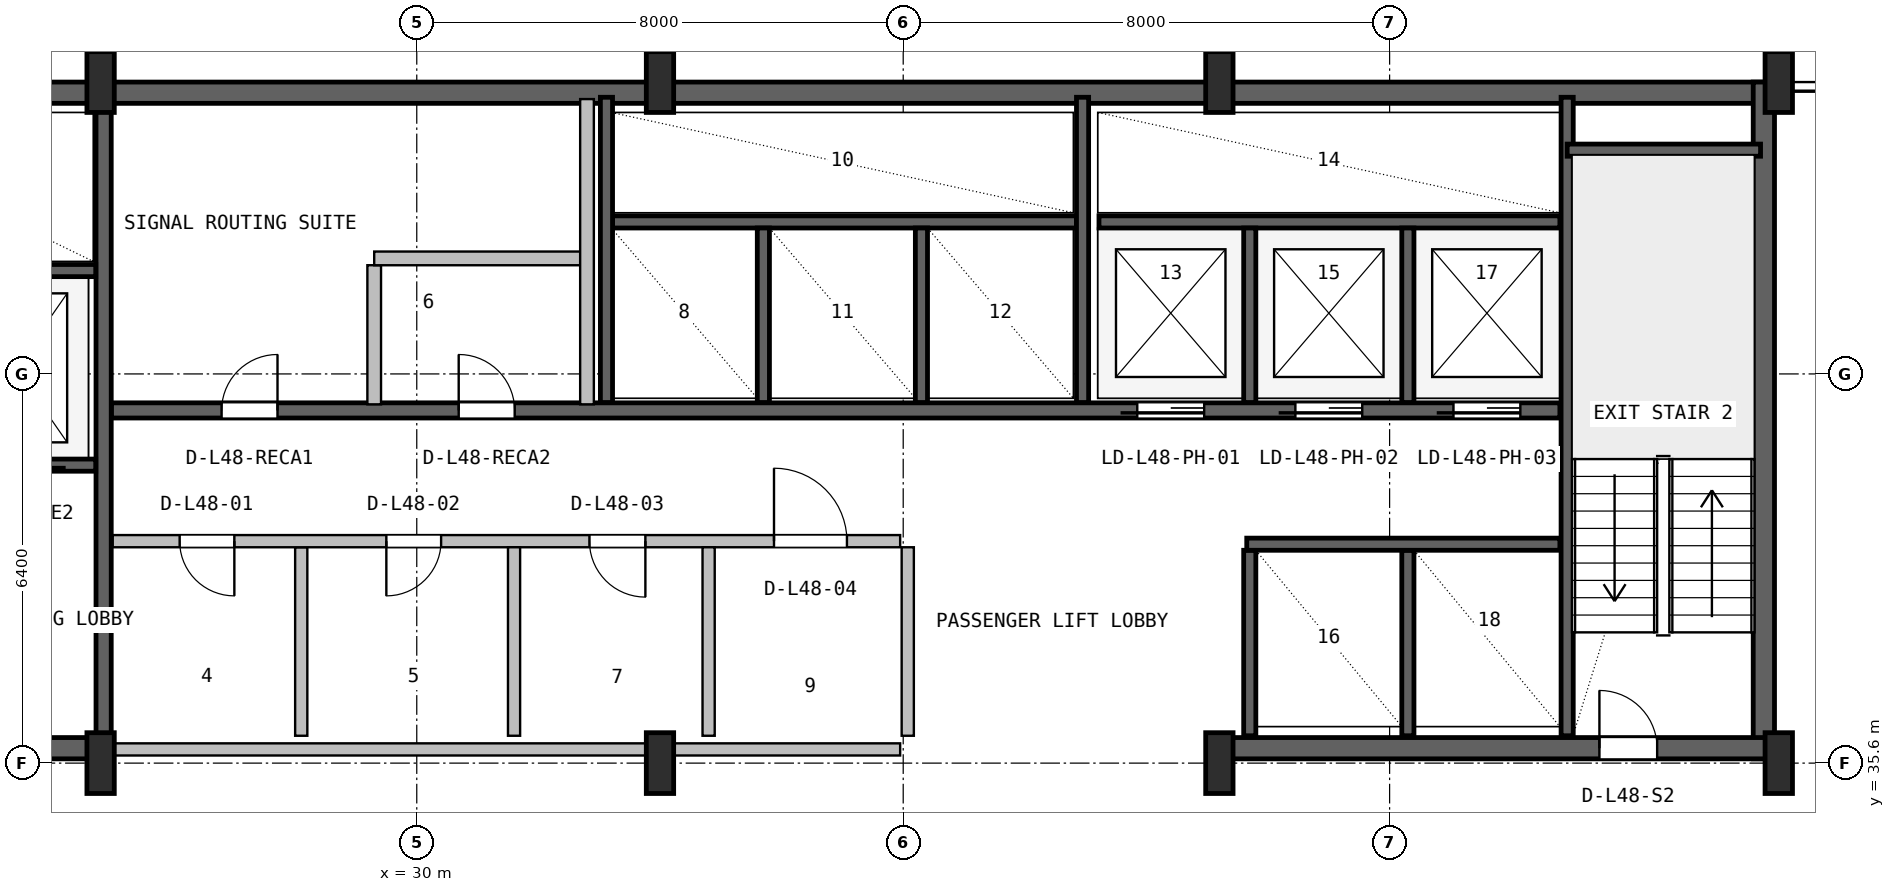
"""IFC4 building model, lengths in metres.
Left out: names, types, materials, properties, quantities, classifications, styles, units other than length and angle.
Written with IfcOpenShell. Run it as: python <this file> out.ifc"""

import sys

from ifc_helpers import new_model, si_unit, direction, frame, frame_2d, origin, origin_2d, place, context, subcontext, project, spatial, rectangle, i_section, extrude, source, transform, mapped, element, fill, save


model = new_model("IFC4")
c1 = context("Model", 3, precision=1e-05, world=origin(), true_north=direction((0.0, 1.0)))
c2 = subcontext(c1, "Body", "Model", "MODEL_VIEW")
j1 = project(units=[si_unit("LENGTHUNIT", "METRE"), si_unit("PLANEANGLEUNIT", "RADIAN")], contexts=[c1])
p1 = place(None, origin())
s1 = spatial("IfcSite", under=j1, at=p1, CompositionType="ELEMENT")
p2 = place(p1, origin())
s2 = spatial("IfcBuilding", under=s1, at=p2, CompositionType="ELEMENT")
p3 = place(p2, frame((0.0, 0.0, 196.0)))
s3 = spatial("IfcBuildingStorey", under=s2, at=p3, CompositionType="ELEMENT", Elevation=196.0)
p4 = place(p3, frame((15.6, 46.625, 0.0), z_axis=(0.0, 0.0, 1.0), x_axis=(1.0, 0.0, 0.0)))
e1 = element("IfcWall", 1, at=p4, inside=s3, PredefinedType="SHEAR", context=c2, shape_type="SweptSolid", body=[
    extrude(rectangle(XDim=36.8, YDim=0.35, at=frame_2d((18.4, 0.0))), origin(), (0.0, 0.0, 1.0), 3.55),
])
p5 = place(p3, frame((52.155, 35.67, 0.0), z_axis=(0.0, 0.0, 1.0), x_axis=(0.0, 1.0, 0.0)))
e2 = element("IfcWall", 2, at=p5, inside=s3, PredefinedType="SHEAR", context=c2, shape_type="SweptSolid", body=[
    extrude(rectangle(XDim=11.13, YDim=0.35, at=frame_2d((5.565, 0.0))), origin(), (0.0, 0.0, 1.0), 3.55),
])
p6 = place(p3, frame((15.67, 35.845, 0.0), z_axis=(0.0, 0.0, 1.0), x_axis=(1.0, 0.0, 0.0)))
e3 = element("IfcWall", 3, at=p6, inside=s3, PredefinedType="SHEAR", context=c2, shape_type="SweptSolid", body=[
    extrude(rectangle(XDim=9.13, YDim=0.35, at=frame_2d((4.565, 0.0))), origin(), (0.0, 0.0, 1.0), 3.55),
])
p7 = place(p6, frame((5.4, 0.0, 0.0)))
e4 = element("IfcOpeningElement", 4, at=p7, cuts=e3, PredefinedType="OPENING", context=c2, shape_type="SweptSolid", body=[
    extrude(rectangle(XDim=1.0, YDim=2.1, at=frame_2d((0.5, 1.05))), frame((0.0, 0.185, 0.0), z_axis=(0.0, -1.0, 0.0), x_axis=(1.0, 0.0, 0.0)), (0.0, 0.0, 1.0), 0.37),
])
p8 = place(p3, frame((43.2, 35.845, 0.0), z_axis=(0.0, 0.0, 1.0), x_axis=(1.0, 0.0, 0.0)))
e5 = element("IfcWall", 5, at=p8, inside=s3, PredefinedType="SHEAR", context=c2, shape_type="SweptSolid", body=[
    extrude(rectangle(XDim=9.13, YDim=0.35, at=frame_2d((4.565, 0.0))), origin(), (0.0, 0.0, 1.0), 3.55),
])
p9 = place(p8, frame((6.25, 0.0, 0.0)))
e6 = element("IfcOpeningElement", 6, at=p9, cuts=e5, PredefinedType="OPENING", context=c2, shape_type="SweptSolid", body=[
    extrude(rectangle(XDim=0.95, YDim=2.1, at=frame_2d((0.475, 1.05))), frame((0.0, 0.185, 0.0), z_axis=(0.0, -1.0, 0.0), x_axis=(1.0, 0.0, 0.0)), (0.0, 0.0, 1.0), 0.37),
])
m1 = source(origin(), c2, "Body", "SweptSolid", [
    extrude(i_section(OverallWidth=0.45, OverallDepth=1.0, WebThickness=0.016, FlangeThickness=0.03, FilletRadius=0.016, at=origin_2d()), origin(), (0.0, 0.0, 1.0), 3.8),
])
for number, where, z_axis, x_axis in (
    (7, (24.8, 35.6, 0.0), (0.0, 0.0, 1.0), (1.0, 0.0, 0.0)),
    (8, (24.8, 46.8, 0.0), (0.0, 0.0, 1.0), (1.0, 0.0, 0.0)),
    (9, (34.0, 35.6, 0.0), (0.0, 0.0, 1.0), (1.0, 0.0, 0.0)),
    (10, (34.0, 46.8, 0.0), (0.0, 0.0, 1.0), (1.0, 0.0, 0.0)),
    (11, (43.2, 35.6, 0.0), (0.0, 0.0, 1.0), (1.0, 0.0, 0.0)),
    (12, (43.2, 46.8, 0.0), (0.0, 0.0, 1.0), (1.0, 0.0, 0.0)),
    (13, (52.4, 35.6, 0.0), (0.0, 0.0, 1.0), (1.0, 0.0, 0.0)),
    (14, (52.4, 46.8, 0.0), (0.0, 0.0, 1.0), (1.0, 0.0, 0.0)),
):
    element("IfcColumn", number, at=place(p3, frame(where, z_axis=z_axis, x_axis=x_axis)), inside=s3, PredefinedType="COLUMN", context=c2, shape_type="MappedRepresentation", body=[
        mapped(m1, transform((0.0, 0.0, 0.0), x_axis=(1.0, 0.0, 0.0), y_axis=(0.0, 1.0, 0.0), z_axis=(0.0, 0.0, 1.0), scale=1.0)),
    ])
p10 = place(p3, frame((24.85, 36.05, 0.0), z_axis=(0.0, 0.0, 1.0), x_axis=(0.0, 1.0, 0.0)))
e15 = element("IfcWall", 15, at=p10, inside=s3, PredefinedType="SHEAR", context=c2, shape_type="SweptSolid", body=[
    extrude(rectangle(XDim=10.45, YDim=0.25, at=frame_2d((5.225, 0.0))), origin(), (0.0, 0.0, 1.0), 3.55),
])
p11 = place(p3, frame((19.2, 40.5, 0.0), z_axis=(0.0, 0.0, 1.0), x_axis=(1.0, 0.0, 0.0)))
e16 = element("IfcWall", 16, at=p11, inside=s3, PredefinedType="SHEAR", context=c2, shape_type="SweptSolid", body=[
    extrude(rectangle(XDim=5.52, YDim=0.2, at=frame_2d((2.76, 0.0))), origin(), (0.0, 0.0, 1.0), 3.55),
])
p12 = place(p11, frame((1.05, 0.0, 0.0)))
e17 = element("IfcOpeningElement", 17, at=p12, cuts=e16, PredefinedType="OPENING", context=c2, shape_type="SweptSolid", body=[
    extrude(rectangle(XDim=1.1, YDim=2.18, at=frame_2d((0.55, 1.09))), frame((0.0, 0.11, 0.0), z_axis=(0.0, -1.0, 0.0), x_axis=(1.0, 0.0, 0.0)), (0.0, 0.0, 1.0), 0.22),
])
p13 = place(p11, frame((3.65, 0.0, 0.0)))
e18 = element("IfcOpeningElement", 18, at=p13, cuts=e16, PredefinedType="OPENING", context=c2, shape_type="SweptSolid", body=[
    extrude(rectangle(XDim=1.1, YDim=2.18, at=frame_2d((0.55, 1.09))), frame((0.0, 0.11, 0.0), z_axis=(0.0, -1.0, 0.0), x_axis=(1.0, 0.0, 0.0)), (0.0, 0.0, 1.0), 0.22),
])
p14 = place(p3, frame((19.2, 43.7, 0.0), z_axis=(0.0, 0.0, 1.0), x_axis=(1.0, 0.0, 0.0)))
e19 = element("IfcWall", 19, at=p14, inside=s3, PredefinedType="SHEAR", context=c2, shape_type="SweptSolid", body=[
    extrude(rectangle(XDim=5.52, YDim=0.2, at=frame_2d((2.76, 0.0))), origin(), (0.0, 0.0, 1.0), 3.55),
])
p15 = place(p3, frame((48.92, 36.05, 0.0), z_axis=(0.0, 0.0, 1.0), x_axis=(0.0, 1.0, 0.0)))
e20 = element("IfcWall", 20, at=p15, inside=s3, PredefinedType="SHEAR", context=c2, shape_type="SweptSolid", body=[
    extrude(rectangle(XDim=10.5, YDim=0.2, at=frame_2d((5.25, 0.0))), origin(), (0.0, 0.0, 1.0), 3.55),
])
p16 = place(p3, frame((48.92, 45.68, 0.0), z_axis=(0.0, 0.0, 1.0), x_axis=(1.0, 0.0, 0.0)))
e21 = element("IfcWall", 21, at=p16, inside=s3, PredefinedType="SHEAR", context=c2, shape_type="SweptSolid", body=[
    extrude(rectangle(XDim=3.18, YDim=0.2, at=frame_2d((1.59, 0.0))), origin(), (0.0, 0.0, 1.0), 3.55),
])
p17 = place(p3, frame((24.98, 41.4, 0.0), z_axis=(0.0, 0.0, 1.0), x_axis=(1.0, 0.0, 0.0)))
e22 = element("IfcWall", 22, at=p17, inside=s3, PredefinedType="SHEAR", context=c2, shape_type="SweptSolid", body=[
    extrude(rectangle(XDim=23.82, YDim=0.25, at=frame_2d((11.91, 0.0))), origin(), (0.0, 0.0, 1.0), 3.55),
])
p18 = place(p17, frame((16.87, 0.0, 0.0)))
e23 = element("IfcOpeningElement", 23, at=p18, cuts=e22, PredefinedType="OPENING", context=c2, shape_type="SweptSolid", body=[
    extrude(rectangle(XDim=1.1, YDim=2.18, at=frame_2d((0.55, 1.09))), frame((0.0, 0.135, 0.0), z_axis=(0.0, -1.0, 0.0), x_axis=(1.0, 0.0, 0.0)), (0.0, 0.0, 1.0), 0.27),
])
p19 = place(p17, frame((19.47, 0.0, 0.0)))
e24 = element("IfcOpeningElement", 24, at=p19, cuts=e22, PredefinedType="OPENING", context=c2, shape_type="SweptSolid", body=[
    extrude(rectangle(XDim=1.1, YDim=2.18, at=frame_2d((0.55, 1.09))), frame((0.0, 0.135, 0.0), z_axis=(0.0, -1.0, 0.0), x_axis=(1.0, 0.0, 0.0)), (0.0, 0.0, 1.0), 0.27),
])
p20 = place(p17, frame((22.07, 0.0, 0.0)))
e25 = element("IfcOpeningElement", 25, at=p20, cuts=e22, PredefinedType="OPENING", context=c2, shape_type="SweptSolid", body=[
    extrude(rectangle(XDim=1.1, YDim=2.18, at=frame_2d((0.55, 1.09))), frame((0.0, 0.135, 0.0), z_axis=(0.0, -1.0, 0.0), x_axis=(1.0, 0.0, 0.0)), (0.0, 0.0, 1.0), 0.27),
])
p21 = place(p17, frame((1.81, 0.0, 0.0)))
e26 = element("IfcOpeningElement", 26, at=p21, cuts=e22, PredefinedType="OPENING", context=c2, shape_type="SweptSolid", body=[
    extrude(rectangle(XDim=0.92, YDim=2.08, at=frame_2d((0.46, 1.04))), frame((0.0, 0.135, 0.0), z_axis=(0.0, -1.0, 0.0), x_axis=(1.0, 0.0, 0.0)), (0.0, 0.0, 1.0), 0.27),
])
p22 = place(p17, frame((5.71, 0.0, 0.0)))
e27 = element("IfcOpeningElement", 27, at=p22, cuts=e22, PredefinedType="OPENING", context=c2, shape_type="SweptSolid", body=[
    extrude(rectangle(XDim=0.92, YDim=2.08, at=frame_2d((0.46, 1.04))), frame((0.0, 0.135, 0.0), z_axis=(0.0, -1.0, 0.0), x_axis=(1.0, 0.0, 0.0)), (0.0, 0.0, 1.0), 0.27),
])
p23 = place(p3, frame((33.22, 44.5, 0.0), z_axis=(0.0, 0.0, 1.0), x_axis=(1.0, 0.0, 0.0)))
e28 = element("IfcWall", 28, at=p23, inside=s3, PredefinedType="SHEAR", context=c2, shape_type="SweptSolid", body=[
    extrude(rectangle(XDim=7.63, YDim=0.2, at=frame_2d((3.815, 0.0))), origin(), (0.0, 0.0, 1.0), 3.55),
])
p24 = place(p3, frame((33.12, 41.53, 0.0), z_axis=(0.0, 0.0, 1.0), x_axis=(0.0, 1.0, 0.0)))
e29 = element("IfcWall", 29, at=p24, inside=s3, PredefinedType="SHEAR", context=c2, shape_type="SweptSolid", body=[
    extrude(rectangle(XDim=5.02, YDim=0.2, at=frame_2d((2.51, 0.0))), origin(), (0.0, 0.0, 1.0), 3.55),
])
for number, where, z_axis, x_axis in (
    (30, (35.7, 41.53, 0.0), (0.0, 0.0, 1.0), (0.0, 1.0, 0.0)),
    (31, (38.3, 41.53, 0.0), (0.0, 0.0, 1.0), (0.0, 1.0, 0.0)),
):
    element("IfcWall", number, at=place(p3, frame(where, z_axis=z_axis, x_axis=x_axis)), inside=s3, PredefinedType="SHEAR", context=c2, shape_type="SweptSolid", body=[
        extrude(rectangle(XDim=2.87, YDim=0.2, at=frame_2d((1.435, 0.0))), origin(), (0.0, 0.0, 1.0), 3.55),
    ])
p25 = place(p3, frame((40.95, 41.53, 0.0), z_axis=(0.0, 0.0, 1.0), x_axis=(0.0, 1.0, 0.0)))
e32 = element("IfcWall", 32, at=p25, inside=s3, PredefinedType="SHEAR", context=c2, shape_type="SweptSolid", body=[
    extrude(rectangle(XDim=5.02, YDim=0.2, at=frame_2d((2.51, 0.0))), origin(), (0.0, 0.0, 1.0), 3.55),
])
p26 = place(p3, frame((41.22, 44.5, 0.0), z_axis=(0.0, 0.0, 1.0), x_axis=(1.0, 0.0, 0.0)))
e33 = element("IfcWall", 33, at=p26, inside=s3, PredefinedType="SHEAR", context=c2, shape_type="SweptSolid", body=[
    extrude(rectangle(XDim=7.58, YDim=0.2, at=frame_2d((3.79, 0.0))), origin(), (0.0, 0.0, 1.0), 3.55),
])
for number, where, z_axis, x_axis in (
    (34, (43.7, 41.53, 0.0), (0.0, 0.0, 1.0), (0.0, 1.0, 0.0)),
    (35, (46.3, 41.53, 0.0), (0.0, 0.0, 1.0), (0.0, 1.0, 0.0)),
):
    element("IfcWall", number, at=place(p3, frame(where, z_axis=z_axis, x_axis=x_axis)), inside=s3, PredefinedType="SHEAR", context=c2, shape_type="SweptSolid", body=[
        extrude(rectangle(XDim=2.87, YDim=0.2, at=frame_2d((1.435, 0.0))), origin(), (0.0, 0.0, 1.0), 3.55),
    ])
for number, where, z_axis, x_axis in (
    (36, (43.7, 36.05, 0.0), (0.0, 0.0, 1.0), (0.0, 1.0, 0.0)),
    (37, (46.3, 36.05, 0.0), (0.0, 0.0, 1.0), (0.0, 1.0, 0.0)),
):
    element("IfcWall", number, at=place(p3, frame(where, z_axis=z_axis, x_axis=x_axis)), inside=s3, PredefinedType="SHEAR", context=c2, shape_type="SweptSolid", body=[
        extrude(rectangle(XDim=3.05, YDim=0.2, at=frame_2d((1.525, 0.0))), origin(), (0.0, 0.0, 1.0), 3.55),
    ])
p27 = place(p3, frame((43.65, 39.2, 0.0), z_axis=(0.0, 0.0, 1.0), x_axis=(1.0, 0.0, 0.0)))
e38 = element("IfcWall", 38, at=p27, inside=s3, PredefinedType="SHEAR", context=c2, shape_type="SweptSolid", body=[
    extrude(rectangle(XDim=5.15, YDim=0.2, at=frame_2d((2.575, 0.0))), origin(), (0.0, 0.0, 1.0), 3.55),
])
p28 = place(p3, frame((25.0, 35.825, 0.0), z_axis=(0.0, 0.0, 1.0), x_axis=(1.0, 0.0, 0.0)))
e39 = element("IfcWall", 39, at=p28, inside=s3, PredefinedType="SOLIDWALL", context=c2, shape_type="SweptSolid", body=[
    extrude(rectangle(XDim=12.95, YDim=0.2, at=frame_2d((6.475, 0.0))), origin(), (0.0, 0.0, 1.0), 2.575),
])
p29 = place(p3, frame((28.1, 36.05, 0.0), z_axis=(0.0, 0.0, 1.0), x_axis=(0.0, 1.0, 0.0)))
e40 = element("IfcWall", 40, at=p29, inside=s3, PredefinedType="PLUMBINGWALL", context=c2, shape_type="SweptSolid", body=[
    extrude(rectangle(XDim=3.1, YDim=0.2, at=frame_2d((1.55, 0.0))), origin(), (0.0, 0.0, 1.0), 3.53),
])
p30 = place(p3, frame((25.0, 39.25, 0.0), z_axis=(0.0, 0.0, 1.0), x_axis=(1.0, 0.0, 0.0)))
e41 = element("IfcWall", 41, at=p30, inside=s3, PredefinedType="SOLIDWALL", context=c2, shape_type="SweptSolid", body=[
    extrude(rectangle(XDim=12.95, YDim=0.2, at=frame_2d((6.475, 0.0))), origin(), (0.0, 0.0, 1.0), 3.53),
])
p31 = place(p30, frame((1.1, 0.0, 0.0)))
e42 = element("IfcOpeningElement", 42, at=p31, cuts=e41, PredefinedType="OPENING", context=c2, shape_type="SweptSolid", body=[
    extrude(rectangle(XDim=0.9, YDim=2.06, at=frame_2d((0.45, 1.03))), frame((0.0, 0.11, 0.0), z_axis=(0.0, -1.0, 0.0), x_axis=(1.0, 0.0, 0.0)), (0.0, 0.0, 1.0), 0.22),
])
p32 = place(p30, frame((4.5, 0.0, 0.0)))
e43 = element("IfcOpeningElement", 43, at=p32, cuts=e41, PredefinedType="OPENING", context=c2, shape_type="SweptSolid", body=[
    extrude(rectangle(XDim=0.9, YDim=2.06, at=frame_2d((0.45, 1.03))), frame((0.0, 0.11, 0.0), z_axis=(0.0, -1.0, 0.0), x_axis=(1.0, 0.0, 0.0)), (0.0, 0.0, 1.0), 0.22),
])
p33 = place(p30, frame((7.84, 0.0, 0.0)))
e44 = element("IfcOpeningElement", 44, at=p33, cuts=e41, PredefinedType="OPENING", context=c2, shape_type="SweptSolid", body=[
    extrude(rectangle(XDim=0.92, YDim=2.08, at=frame_2d((0.46, 1.04))), frame((0.0, 0.11, 0.0), z_axis=(0.0, -1.0, 0.0), x_axis=(1.0, 0.0, 0.0)), (0.0, 0.0, 1.0), 0.22),
])
p34 = place(p30, frame((10.875, 0.0, 0.0)))
e45 = element("IfcOpeningElement", 45, at=p34, cuts=e41, PredefinedType="OPENING", context=c2, shape_type="SweptSolid", body=[
    extrude(rectangle(XDim=1.2, YDim=2.1, at=frame_2d((0.6, 1.05))), frame((0.0, 0.11, 0.0), z_axis=(0.0, -1.0, 0.0), x_axis=(1.0, 0.0, 0.0)), (0.0, 0.0, 1.0), 0.22),
])
p35 = place(p3, frame((31.6, 36.05, 0.0), z_axis=(0.0, 0.0, 1.0), x_axis=(0.0, 1.0, 0.0)))
e46 = element("IfcWall", 46, at=p35, inside=s3, PredefinedType="PLUMBINGWALL", context=c2, shape_type="SweptSolid", body=[
    extrude(rectangle(XDim=3.1, YDim=0.2, at=frame_2d((1.55, 0.0))), origin(), (0.0, 0.0, 1.0), 3.53),
])
for number, where, z_axis, x_axis in (
    (47, (34.8, 36.05, 0.0), (0.0, 0.0, 1.0), (0.0, 1.0, 0.0)),
    (48, (38.075, 36.05, 0.0), (0.0, 0.0, 1.0), (0.0, 1.0, 0.0)),
):
    element("IfcWall", number, at=place(p3, frame(where, z_axis=z_axis, x_axis=x_axis)), inside=s3, PredefinedType="SOLIDWALL", context=c2, shape_type="SweptSolid", body=[
        extrude(rectangle(XDim=3.1, YDim=0.2, at=frame_2d((1.55, 0.0))), origin(), (0.0, 0.0, 1.0), 3.53),
    ])
p36 = place(p3, frame((29.3, 41.5, 0.0), z_axis=(0.0, 0.0, 1.0), x_axis=(0.0, 1.0, 0.0)))
e49 = element("IfcWall", 49, at=p36, inside=s3, PredefinedType="PARTITIONING", context=c2, shape_type="SweptSolid", body=[
    extrude(rectangle(XDim=2.288, YDim=0.225, at=frame_2d((1.144, 0.0))), origin(), (0.0, 0.0, 1.0), 3.53),
])
p37 = place(p3, frame((29.3, 43.9, 0.0), z_axis=(0.0, 0.0, 1.0), x_axis=(1.0, 0.0, 0.0)))
e50 = element("IfcWall", 50, at=p37, inside=s3, PredefinedType="PARTITIONING", context=c2, shape_type="SweptSolid", body=[
    extrude(rectangle(XDim=3.5, YDim=0.225, at=frame_2d((1.75, 0.0))), origin(), (0.0, 0.0, 1.0), 3.53),
])
p38 = place(p3, frame((32.8, 41.5, 0.0), z_axis=(0.0, 0.0, 1.0), x_axis=(0.0, 1.0, 0.0)))
e51 = element("IfcWall", 51, at=p38, inside=s3, PredefinedType="PARTITIONING", context=c2, shape_type="SweptSolid", body=[
    extrude(rectangle(XDim=5.02, YDim=0.225, at=frame_2d((2.51, 0.0))), origin(), (0.0, 0.0, 1.0), 3.53),
])
m2 = source(origin(), c2, "Body", "SweptSolid", [
    extrude(rectangle(XDim=0.95, YDim=2.1, at=frame_2d((0.475, 1.05))), frame((0.0, 0.025, 0.0), z_axis=(0.0, -1.0, 0.0), x_axis=(1.0, 0.0, 0.0)), (0.0, 0.0, 1.0), 0.05),
])
p39 = place(p9, origin())
e52 = element("IfcDoor", 52, at=p39, inside=s3, OperationType="SINGLE_SWING_LEFT", PredefinedType="DOOR", context=c2, shape_type="MappedRepresentation", body=[
    mapped(m2, transform((0.0, 0.0, 0.0), x_axis=(1.0, 0.0, 0.0), y_axis=(0.0, 1.0, 0.0), z_axis=(0.0, 0.0, 1.0), scale=1.0)),
])
fill(e6, e52)
m3 = source(origin(), c2, "Body", "SweptSolid", [
    extrude(rectangle(XDim=1.1, YDim=2.18, at=frame_2d((0.55, 1.09))), frame((0.0, 0.025, 0.0), z_axis=(0.0, -1.0, 0.0), x_axis=(1.0, 0.0, 0.0)), (0.0, 0.0, 1.0), 0.05),
])
p40 = place(p18, frame((1.1, 0.0, 0.0), z_axis=(0.0, 0.0, 1.0), x_axis=(-1.0, 0.0, 0.0)))
e53 = element("IfcDoor", 53, at=p40, inside=s3, OperationType="SLIDING_TO_LEFT", PredefinedType="DOOR", context=c2, shape_type="MappedRepresentation", body=[
    mapped(m3, transform((0.0, 0.0, 0.0), x_axis=(1.0, 0.0, 0.0), y_axis=(0.0, 1.0, 0.0), z_axis=(0.0, 0.0, 1.0), scale=1.0)),
])
fill(e23, e53)
p41 = place(p19, frame((1.1, 0.0, 0.0), z_axis=(0.0, 0.0, 1.0), x_axis=(-1.0, 0.0, 0.0)))
e54 = element("IfcDoor", 54, at=p41, inside=s3, OperationType="SLIDING_TO_LEFT", PredefinedType="DOOR", context=c2, shape_type="MappedRepresentation", body=[
    mapped(m3, transform((0.0, 0.0, 0.0), x_axis=(1.0, 0.0, 0.0), y_axis=(0.0, 1.0, 0.0), z_axis=(0.0, 0.0, 1.0), scale=1.0)),
])
fill(e24, e54)
p42 = place(p20, frame((1.1, 0.0, 0.0), z_axis=(0.0, 0.0, 1.0), x_axis=(-1.0, 0.0, 0.0)))
e55 = element("IfcDoor", 55, at=p42, inside=s3, OperationType="SLIDING_TO_LEFT", PredefinedType="DOOR", context=c2, shape_type="MappedRepresentation", body=[
    mapped(m3, transform((0.0, 0.0, 0.0), x_axis=(1.0, 0.0, 0.0), y_axis=(0.0, 1.0, 0.0), z_axis=(0.0, 0.0, 1.0), scale=1.0)),
])
fill(e25, e55)
m4 = source(origin(), c2, "Body", "SweptSolid", [
    extrude(rectangle(XDim=0.92, YDim=2.08, at=frame_2d((0.46, 1.04))), frame((0.0, 0.025, 0.0), z_axis=(0.0, -1.0, 0.0), x_axis=(1.0, 0.0, 0.0)), (0.0, 0.0, 1.0), 0.05),
])
p43 = place(p21, origin())
e56 = element("IfcDoor", 56, at=p43, inside=s3, OperationType="SINGLE_SWING_RIGHT", PredefinedType="DOOR", context=c2, shape_type="MappedRepresentation", body=[
    mapped(m4, transform((0.0, 0.0, 0.0), x_axis=(1.0, 0.0, 0.0), y_axis=(0.0, 1.0, 0.0), z_axis=(0.0, 0.0, 1.0), scale=1.0)),
])
fill(e26, e56)
p44 = place(p22, origin())
e57 = element("IfcDoor", 57, at=p44, inside=s3, OperationType="SINGLE_SWING_LEFT", PredefinedType="DOOR", context=c2, shape_type="MappedRepresentation", body=[
    mapped(m4, transform((0.0, 0.0, 0.0), x_axis=(1.0, 0.0, 0.0), y_axis=(0.0, 1.0, 0.0), z_axis=(0.0, 0.0, 1.0), scale=1.0)),
])
fill(e27, e57)
m5 = source(origin(), c2, "Body", "SweptSolid", [
    extrude(rectangle(XDim=0.9, YDim=2.06, at=frame_2d((0.45, 1.03))), frame((0.0, 0.025, 0.0), z_axis=(0.0, -1.0, 0.0), x_axis=(1.0, 0.0, 0.0)), (0.0, 0.0, 1.0), 0.05),
])
p45 = place(p31, frame((0.9, 0.0, 0.0), z_axis=(0.0, 0.0, 1.0), x_axis=(-1.0, 0.0, 0.0)))
e58 = element("IfcDoor", 58, at=p45, inside=s3, OperationType="SINGLE_SWING_RIGHT", PredefinedType="DOOR", context=c2, shape_type="MappedRepresentation", body=[
    mapped(m5, transform((0.0, 0.0, 0.0), x_axis=(1.0, 0.0, 0.0), y_axis=(0.0, 1.0, 0.0), z_axis=(0.0, 0.0, 1.0), scale=1.0)),
])
fill(e42, e58)
p46 = place(p32, frame((0.9, 0.0, 0.0), z_axis=(0.0, 0.0, 1.0), x_axis=(-1.0, 0.0, 0.0)))
e59 = element("IfcDoor", 59, at=p46, inside=s3, OperationType="SINGLE_SWING_LEFT", PredefinedType="DOOR", context=c2, shape_type="MappedRepresentation", body=[
    mapped(m5, transform((0.0, 0.0, 0.0), x_axis=(1.0, 0.0, 0.0), y_axis=(0.0, 1.0, 0.0), z_axis=(0.0, 0.0, 1.0), scale=1.0)),
])
fill(e43, e59)
p47 = place(p33, frame((0.92, 0.0, 0.0), z_axis=(0.0, 0.0, 1.0), x_axis=(-1.0, 0.0, 0.0)))
e60 = element("IfcDoor", 60, at=p47, inside=s3, OperationType="SINGLE_SWING_RIGHT", PredefinedType="DOOR", context=c2, shape_type="MappedRepresentation", body=[
    mapped(m4, transform((0.0, 0.0, 0.0), x_axis=(1.0, 0.0, 0.0), y_axis=(0.0, 1.0, 0.0), z_axis=(0.0, 0.0, 1.0), scale=1.0)),
])
fill(e44, e60)
m6 = source(origin(), c2, "Body", "SweptSolid", [
    extrude(rectangle(XDim=1.2, YDim=2.1, at=frame_2d((0.6, 1.05))), frame((0.0, 0.025, 0.0), z_axis=(0.0, -1.0, 0.0), x_axis=(1.0, 0.0, 0.0)), (0.0, 0.0, 1.0), 0.05),
])
p48 = place(p34, origin())
e61 = element("IfcDoor", 61, at=p48, inside=s3, OperationType="SINGLE_SWING_LEFT", PredefinedType="DOOR", context=c2, shape_type="MappedRepresentation", body=[
    mapped(m6, transform((0.0, 0.0, 0.0), x_axis=(1.0, 0.0, 0.0), y_axis=(0.0, 1.0, 0.0), z_axis=(0.0, 0.0, 1.0), scale=1.0)),
])
fill(e45, e61)
save(model, sys.argv[1])
